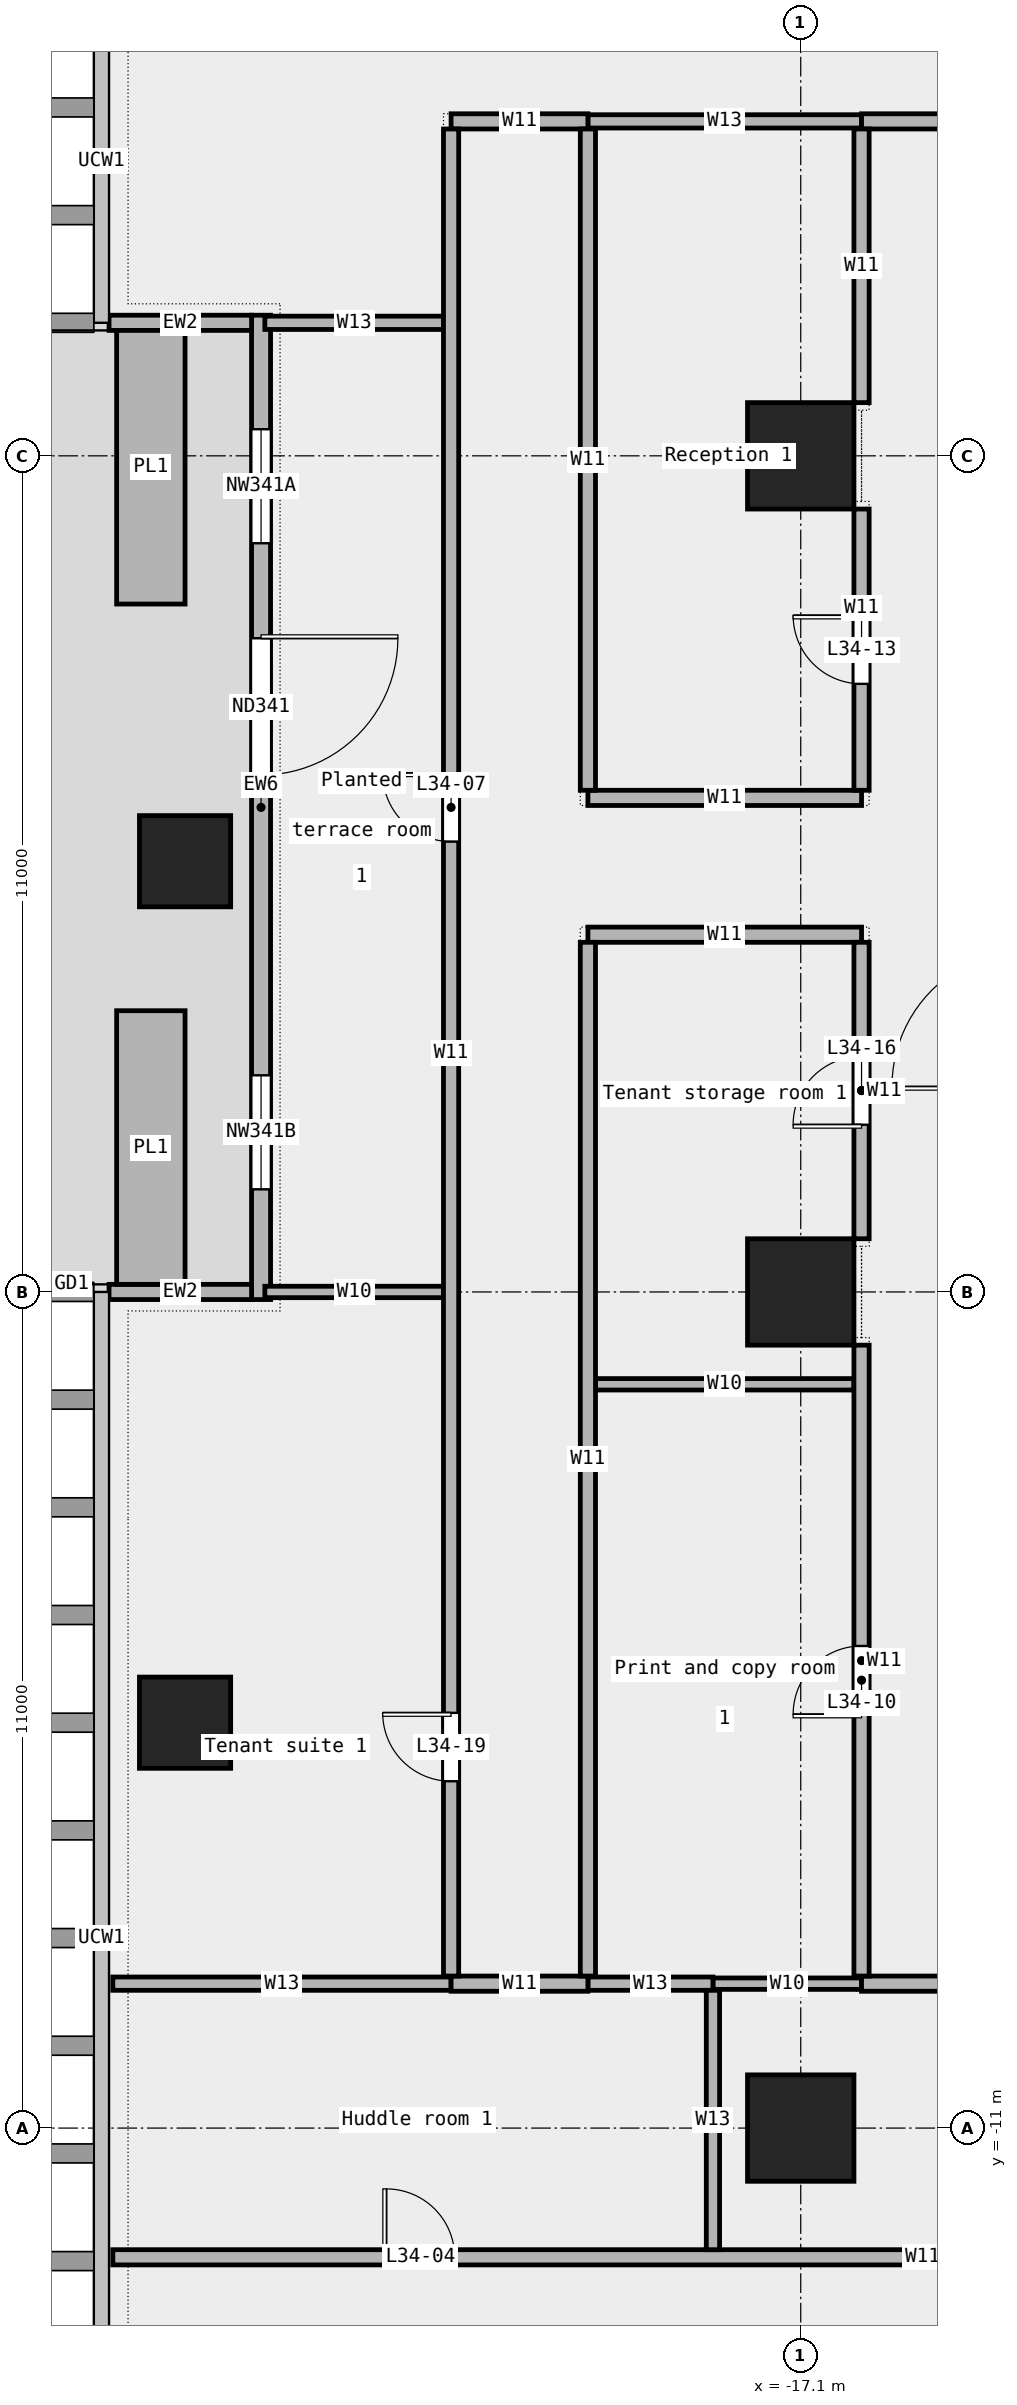
"""IFC4 building model, lengths in metres.
Left out: names, types, materials, properties, quantities, classifications, styles, units other than length and angle.
Written with IfcOpenShell. Run it as: python <this file> out.ifc"""

import sys

from ifc_helpers import new_model, si_unit, direction, frame, frame_2d, origin, origin_2d, place, context, subcontext, project, spatial, rectangle, extrude, element, fill, save


model = new_model("IFC4")
c1 = context("Model", 3, precision=1e-05, world=origin(), true_north=direction((0.0, 1.0)))
c2 = subcontext(c1, "Body", "Model", "MODEL_VIEW")
j1 = project(units=[si_unit("LENGTHUNIT", "METRE"), si_unit("PLANEANGLEUNIT", "RADIAN")], contexts=[c1])
p1 = place(None, origin())
s1 = spatial("IfcSite", under=j1, at=p1, CompositionType="ELEMENT")
p2 = place(p1, origin())
s2 = spatial("IfcBuilding", under=s1, at=p2, CompositionType="ELEMENT")
p3 = place(p2, frame((0.0, 0.0, 169.0)))
s3 = spatial("IfcBuildingStorey", under=s2, at=p3, CompositionType="ELEMENT", Elevation=169.0)
for number, where, z_axis, x_axis in (
    (1, (-25.2, 5.667, 0.0), (0.0, 0.0, 1.0), (1.0, 0.0, 0.0)),
    (2, (-25.2, -5.667, 0.0), (0.0, 0.0, 1.0), (1.0, 0.0, 0.0)),
):
    element("IfcColumn", number, at=place(p3, frame(where, z_axis=z_axis, x_axis=x_axis)), inside=s3, PredefinedType="COLUMN", context=c2, shape_type="SweptSolid", body=[
        extrude(rectangle(XDim=1.2, YDim=1.2, at=origin_2d()), origin(), (0.0, 0.0, 1.0), 3.6),
    ])
for number, where, z_axis, x_axis in (
    (3, (-17.1, -11.0, 0.0), (0.0, 0.0, 1.0), (1.0, 0.0, 0.0)),
    (4, (-17.1, 0.0, 0.0), (0.0, 0.0, 1.0), (1.0, 0.0, 0.0)),
    (5, (-17.1, 11.0, 0.0), (0.0, 0.0, 1.0), (1.0, 0.0, 0.0)),
):
    element("IfcColumn", number, at=place(p3, frame(where, z_axis=z_axis, x_axis=x_axis)), inside=s3, PredefinedType="COLUMN", context=c2, shape_type="SweptSolid", body=[
        extrude(rectangle(XDim=1.4, YDim=1.4, at=origin_2d()), origin(), (0.0, 0.0, 1.0), 3.6),
    ])
p4 = place(p3, frame((-24.2, 12.85, 0.0), z_axis=(0.0, 0.0, 1.0), x_axis=(0.0, -1.0, 0.0)))
e6 = element("IfcWall", 6, at=p4, inside=s3, PredefinedType="STANDARD", context=c2, shape_type="SweptSolid", body=[
    extrude(rectangle(XDim=12.95, YDim=0.25, at=frame_2d((6.475, 0.0))), origin(), (0.0, 0.0, 1.0), 3.6),
])
p5 = place(p4, frame((1.5, 0.0, 0.45)))
e7 = element("IfcOpeningElement", 7, at=p5, cuts=e6, PredefinedType="OPENING", context=c2, shape_type="SweptSolid", body=[
    extrude(rectangle(XDim=1.5, YDim=2.4, at=frame_2d((0.75, 1.2))), frame((0.0, 0.137, 0.0), z_axis=(0.0, -1.0, 0.0), x_axis=(1.0, 0.0, 0.0)), (0.0, 0.0, 1.0), 0.274),
])
p6 = place(p4, frame((4.25, 0.0, 0.0)))
e8 = element("IfcOpeningElement", 8, at=p6, cuts=e6, PredefinedType="OPENING", context=c2, shape_type="SweptSolid", body=[
    extrude(rectangle(XDim=1.8, YDim=2.4, at=frame_2d((0.9, 1.2))), frame((0.0, 0.137, 0.0), z_axis=(0.0, -1.0, 0.0), x_axis=(1.0, 0.0, 0.0)), (0.0, 0.0, 1.0), 0.274),
])
p7 = place(p4, frame((10.0, 0.0, 0.45)))
e9 = element("IfcOpeningElement", 9, at=p7, cuts=e6, PredefinedType="OPENING", context=c2, shape_type="SweptSolid", body=[
    extrude(rectangle(XDim=1.5, YDim=2.4, at=frame_2d((0.75, 1.2))), frame((0.0, 0.137, 0.0), z_axis=(0.0, -1.0, 0.0), x_axis=(1.0, 0.0, 0.0)), (0.0, 0.0, 1.0), 0.274),
])
for number, where, z_axis, x_axis in (
    (10, (-26.2, 12.75, 0.0), (0.0, 0.0, 1.0), (1.0, 0.0, 0.0)),
    (11, (-26.2, 0.0, 0.0), (0.0, 0.0, 1.0), (1.0, 0.0, 0.0)),
):
    element("IfcWall", number, at=place(p3, frame(where, z_axis=z_axis, x_axis=x_axis)), inside=s3, PredefinedType="STANDARD", context=c2, shape_type="SweptSolid", body=[
        extrude(rectangle(XDim=1.875, YDim=0.2, at=frame_2d((0.938, 0.0))), origin(), (0.0, 0.0, 1.0), 3.6),
    ])
for number, where, z_axis, x_axis in (
    (12, (-25.65, 12.65, 0.0), (0.0, 0.0, 1.0), (0.0, -1.0, 0.0)),
    (13, (-25.65, 3.7, 0.0), (0.0, 0.0, 1.0), (0.0, -1.0, 0.0)),
):
    element("IfcWall", number, at=place(p3, frame(where, z_axis=z_axis, x_axis=x_axis)), inside=s3, PredefinedType="STANDARD", context=c2, shape_type="SweptSolid", body=[
        extrude(rectangle(XDim=3.6, YDim=0.9, at=frame_2d((1.8, 0.0))), origin(), (0.0, 0.0, 1.0), 0.7),
    ])
p8 = place(p3, frame((-26.15, -12.7, 0.0), z_axis=(0.0, 0.0, 1.0), x_axis=(1.0, 0.0, 0.0)))
e14 = element("IfcWall", 14, at=p8, inside=s3, PredefinedType="PARTITIONING", context=c2, shape_type="SweptSolid", body=[
    extrude(rectangle(XDim=21.31, YDim=0.2, at=frame_2d((10.655, 0.0))), origin(), (0.0, 0.0, 1.0), 3.6),
])
p9 = place(p8, frame((3.597, 0.0, 0.0)))
e15 = element("IfcOpeningElement", 15, at=p9, cuts=e14, PredefinedType="OPENING", context=c2, shape_type="SweptSolid", body=[
    extrude(rectangle(XDim=0.9, YDim=2.1, at=frame_2d((0.45, 1.05))), frame((0.0, 0.112, 0.0), z_axis=(0.0, -1.0, 0.0), x_axis=(1.0, 0.0, 0.0)), (0.0, 0.0, 1.0), 0.224),
])
p10 = place(p8, frame((14.002, 0.0, 0.0)))
e16 = element("IfcOpeningElement", 16, at=p10, cuts=e14, PredefinedType="OPENING", context=c2, shape_type="SweptSolid", body=[
    extrude(rectangle(XDim=1.2, YDim=2.1, at=frame_2d((0.6, 1.05))), frame((0.0, 0.112, 0.0), z_axis=(0.0, -1.0, 0.0), x_axis=(1.0, 0.0, 0.0)), (0.0, 0.0, 1.0), 0.224),
])
p11 = place(p3, frame((-18.255, -9.1, 0.0), z_axis=(0.0, 0.0, 1.0), x_axis=(1.0, 0.0, 0.0)))
e17 = element("IfcWall", 17, at=p11, inside=s3, PredefinedType="PARTITIONING", context=c2, shape_type="SweptSolid", body=[
    extrude(rectangle(XDim=1.955, YDim=0.15, at=frame_2d((0.978, 0.0))), origin(), (0.0, 0.0, 1.0), 3.6),
])
p12 = place(p3, frame((-26.15, -9.1, 0.0), z_axis=(0.0, 0.0, 1.0), x_axis=(1.0, 0.0, 0.0)))
e18 = element("IfcWall", 18, at=p12, inside=s3, PredefinedType="PARTITIONING", context=c2, shape_type="SweptSolid", body=[
    extrude(rectangle(XDim=4.45, YDim=0.175, at=frame_2d((2.225, 0.0))), origin(), (0.0, 0.0, 1.0), 3.6),
])
p13 = place(p3, frame((-19.9, -9.1, 0.0), z_axis=(0.0, 0.0, 1.0), x_axis=(1.0, 0.0, 0.0)))
e19 = element("IfcWall", 19, at=p13, inside=s3, PredefinedType="PARTITIONING", context=c2, shape_type="SweptSolid", body=[
    extrude(rectangle(XDim=1.645, YDim=0.175, at=frame_2d((0.823, 0.0))), origin(), (0.0, 0.0, 1.0), 3.6),
])
p14 = place(p3, frame((-21.7, -9.1, 0.0), z_axis=(0.0, 0.0, 1.0), x_axis=(1.0, 0.0, 0.0)))
e20 = element("IfcWall", 20, at=p14, inside=s3, PredefinedType="PARTITIONING", context=c2, shape_type="SweptSolid", body=[
    extrude(rectangle(XDim=1.8, YDim=0.2, at=frame_2d((0.9, 0.0))), origin(), (0.0, 0.0, 1.0), 3.6),
])
p15 = place(p3, frame((-16.3, -9.1, 0.0), z_axis=(0.0, 0.0, 1.0), x_axis=(1.0, 0.0, 0.0)))
e21 = element("IfcWall", 21, at=p15, inside=s3, PredefinedType="PARTITIONING", context=c2, shape_type="SweptSolid", body=[
    extrude(rectangle(XDim=11.46, YDim=0.2, at=frame_2d((5.73, 0.0))), origin(), (0.0, 0.0, 1.0), 3.6),
])
p16 = place(p3, frame((-19.8, -1.215, 0.0), z_axis=(0.0, 0.0, 1.0), x_axis=(1.0, 0.0, 0.0)))
e22 = element("IfcWall", 22, at=p16, inside=s3, PredefinedType="PARTITIONING", context=c2, shape_type="SweptSolid", body=[
    extrude(rectangle(XDim=3.4, YDim=0.15, at=frame_2d((1.7, 0.0))), origin(), (0.0, 0.0, 1.0), 3.6),
])
p17 = place(p3, frame((-24.15, 0.0, 0.0), z_axis=(0.0, 0.0, 1.0), x_axis=(1.0, 0.0, 0.0)))
e23 = element("IfcWall", 23, at=p17, inside=s3, PredefinedType="PARTITIONING", context=c2, shape_type="SweptSolid", body=[
    extrude(rectangle(XDim=2.35, YDim=0.15, at=frame_2d((1.175, 0.0))), origin(), (0.0, 0.0, 1.0), 3.6),
])
for number, where, z_axis, x_axis in (
    (24, (-19.9, 4.7, 0.0), (0.0, 0.0, 1.0), (1.0, 0.0, 0.0)),
    (25, (-19.9, 6.5, 0.0), (0.0, 0.0, 1.0), (1.0, 0.0, 0.0)),
):
    element("IfcWall", number, at=place(p3, frame(where, z_axis=z_axis, x_axis=x_axis)), inside=s3, PredefinedType="PARTITIONING", context=c2, shape_type="SweptSolid", body=[
        extrude(rectangle(XDim=3.6, YDim=0.2, at=frame_2d((1.8, 0.0))), origin(), (0.0, 0.0, 1.0), 3.6),
    ])
p18 = place(p3, frame((-24.15, 12.75, 0.0), z_axis=(0.0, 0.0, 1.0), x_axis=(1.0, 0.0, 0.0)))
e26 = element("IfcWall", 26, at=p18, inside=s3, PredefinedType="PARTITIONING", context=c2, shape_type="SweptSolid", body=[
    extrude(rectangle(XDim=2.35, YDim=0.175, at=frame_2d((1.175, 0.0))), origin(), (0.0, 0.0, 1.0), 3.6),
])
p19 = place(p3, frame((-19.9, 15.4, 0.0), z_axis=(0.0, 0.0, 1.0), x_axis=(1.0, 0.0, 0.0)))
e27 = element("IfcWall", 27, at=p19, inside=s3, PredefinedType="PARTITIONING", context=c2, shape_type="SweptSolid", body=[
    extrude(rectangle(XDim=3.6, YDim=0.175, at=frame_2d((1.8, 0.0))), origin(), (0.0, 0.0, 1.0), 3.6),
])
p20 = place(p3, frame((-21.7, 15.4, 0.0), z_axis=(0.0, 0.0, 1.0), x_axis=(1.0, 0.0, 0.0)))
e28 = element("IfcWall", 28, at=p20, inside=s3, PredefinedType="PARTITIONING", context=c2, shape_type="SweptSolid", body=[
    extrude(rectangle(XDim=1.8, YDim=0.2, at=frame_2d((0.9, 0.0))), origin(), (0.0, 0.0, 1.0), 3.6),
])
p21 = place(p3, frame((-16.3, 15.4, 0.0), z_axis=(0.0, 0.0, 1.0), x_axis=(1.0, 0.0, 0.0)))
e29 = element("IfcWall", 29, at=p21, inside=s3, PredefinedType="PARTITIONING", context=c2, shape_type="SweptSolid", body=[
    extrude(rectangle(XDim=32.6, YDim=0.2, at=frame_2d((16.3, 0.0))), origin(), (0.0, 0.0, 1.0), 3.6),
])
p22 = place(p21, frame((24.415, 0.0, 0.0)))
e30 = element("IfcOpeningElement", 30, at=p22, cuts=e29, PredefinedType="OPENING", context=c2, shape_type="SweptSolid", body=[
    extrude(rectangle(XDim=1.8, YDim=2.1, at=frame_2d((0.9, 1.05))), frame((0.0, 0.112, 0.0), z_axis=(0.0, -1.0, 0.0), x_axis=(1.0, 0.0, 0.0)), (0.0, 0.0, 1.0), 0.224),
])
p23 = place(p21, frame((12.24, 0.0, 0.0)))
e31 = element("IfcOpeningElement", 31, at=p23, cuts=e29, PredefinedType="OPENING", context=c2, shape_type="SweptSolid", body=[
    extrude(rectangle(XDim=1.2, YDim=2.1, at=frame_2d((0.6, 1.05))), frame((0.0, 0.112, 0.0), z_axis=(0.0, -1.0, 0.0), x_axis=(1.0, 0.0, 0.0)), (0.0, 0.0, 1.0), 0.224),
])
p24 = place(p21, frame((3.075, 0.0, 0.0)))
e32 = element("IfcOpeningElement", 32, at=p24, cuts=e29, PredefinedType="OPENING", context=c2, shape_type="SweptSolid", body=[
    extrude(rectangle(XDim=1.5, YDim=2.1, at=frame_2d((0.75, 1.05))), frame((0.0, 0.112, 0.0), z_axis=(0.0, -1.0, 0.0), x_axis=(1.0, 0.0, 0.0)), (0.0, 0.0, 1.0), 0.224),
])
p25 = place(p3, frame((-21.7, -9.0, 0.0), z_axis=(0.0, 0.0, 1.0), x_axis=(0.0, 1.0, 0.0)))
e33 = element("IfcWall", 33, at=p25, inside=s3, PredefinedType="PARTITIONING", context=c2, shape_type="SweptSolid", body=[
    extrude(rectangle(XDim=24.3, YDim=0.2, at=frame_2d((12.15, 0.0))), origin(), (0.0, 0.0, 1.0), 3.6),
])
p26 = place(p25, frame((14.925, 0.0, 0.0)))
e34 = element("IfcOpeningElement", 34, at=p26, cuts=e33, PredefinedType="OPENING", context=c2, shape_type="SweptSolid", body=[
    extrude(rectangle(XDim=0.9, YDim=2.1, at=frame_2d((0.45, 1.05))), frame((0.0, 0.112, 0.0), z_axis=(0.0, -1.0, 0.0), x_axis=(1.0, 0.0, 0.0)), (0.0, 0.0, 1.0), 0.224),
])
p27 = place(p25, frame((2.562, 0.0, 0.0)))
e35 = element("IfcOpeningElement", 35, at=p27, cuts=e33, PredefinedType="OPENING", context=c2, shape_type="SweptSolid", body=[
    extrude(rectangle(XDim=0.9, YDim=2.1, at=frame_2d((0.45, 1.05))), frame((0.0, 0.112, 0.0), z_axis=(0.0, -1.0, 0.0), x_axis=(1.0, 0.0, 0.0)), (0.0, 0.0, 1.0), 0.224),
])
p28 = place(p3, frame((-19.9, -9.0, 0.0), z_axis=(0.0, 0.0, 1.0), x_axis=(0.0, 1.0, 0.0)))
e36 = element("IfcWall", 36, at=p28, inside=s3, PredefinedType="PARTITIONING", context=c2, shape_type="SweptSolid", body=[
    extrude(rectangle(XDim=13.6, YDim=0.2, at=frame_2d((6.8, 0.0))), origin(), (0.0, 0.0, 1.0), 3.6),
])
p29 = place(p3, frame((-19.9, 6.6, 0.0), z_axis=(0.0, 0.0, 1.0), x_axis=(0.0, 1.0, 0.0)))
e37 = element("IfcWall", 37, at=p29, inside=s3, PredefinedType="PARTITIONING", context=c2, shape_type="SweptSolid", body=[
    extrude(rectangle(XDim=8.7, YDim=0.2, at=frame_2d((4.35, 0.0))), origin(), (0.0, 0.0, 1.0), 3.6),
])
p30 = place(p3, frame((-18.255, -12.6, 0.0), z_axis=(0.0, 0.0, 1.0), x_axis=(0.0, 1.0, 0.0)))
e38 = element("IfcWall", 38, at=p30, inside=s3, PredefinedType="PARTITIONING", context=c2, shape_type="SweptSolid", body=[
    extrude(rectangle(XDim=3.412, YDim=0.175, at=frame_2d((1.706, 0.0))), origin(), (0.0, 0.0, 1.0), 3.6),
])
p31 = place(p3, frame((-16.3, -9.0, 0.0), z_axis=(0.0, 0.0, 1.0), x_axis=(0.0, 1.0, 0.0)))
e39 = element("IfcWall", 39, at=p31, inside=s3, PredefinedType="PARTITIONING", context=c2, shape_type="SweptSolid", body=[
    extrude(rectangle(XDim=8.3, YDim=0.2, at=frame_2d((4.15, 0.0))), origin(), (0.0, 0.0, 1.0), 3.6),
])
p32 = place(p31, frame((3.442, 0.0, 0.0)))
e40 = element("IfcOpeningElement", 40, at=p32, cuts=e39, PredefinedType="OPENING", context=c2, shape_type="SweptSolid", body=[
    extrude(rectangle(XDim=0.9, YDim=2.1, at=frame_2d((0.45, 1.05))), frame((0.0, 0.112, 0.0), z_axis=(0.0, -1.0, 0.0), x_axis=(1.0, 0.0, 0.0)), (0.0, 0.0, 1.0), 0.224),
])
p33 = place(p3, frame((-16.3, 0.7, 0.0), z_axis=(0.0, 0.0, 1.0), x_axis=(0.0, 1.0, 0.0)))
e41 = element("IfcWall", 41, at=p33, inside=s3, PredefinedType="PARTITIONING", context=c2, shape_type="SweptSolid", body=[
    extrude(rectangle(XDim=3.9, YDim=0.2, at=frame_2d((1.95, 0.0))), origin(), (0.0, 0.0, 1.0), 3.6),
])
p34 = place(p33, frame((1.5, 0.0, 0.0)))
e42 = element("IfcOpeningElement", 42, at=p34, cuts=e41, PredefinedType="OPENING", context=c2, shape_type="SweptSolid", body=[
    extrude(rectangle(XDim=0.9, YDim=2.1, at=frame_2d((0.45, 1.05))), frame((0.0, 0.112, 0.0), z_axis=(0.0, -1.0, 0.0), x_axis=(1.0, 0.0, 0.0)), (0.0, 0.0, 1.0), 0.224),
])
p35 = place(p3, frame((-16.3, 6.6, 0.0), z_axis=(0.0, 0.0, 1.0), x_axis=(0.0, 1.0, 0.0)))
e43 = element("IfcWall", 43, at=p35, inside=s3, PredefinedType="PARTITIONING", context=c2, shape_type="SweptSolid", body=[
    extrude(rectangle(XDim=3.7, YDim=0.2, at=frame_2d((1.85, 0.0))), origin(), (0.0, 0.0, 1.0), 3.6),
])
p36 = place(p35, frame((1.4, 0.0, 0.0)))
e44 = element("IfcOpeningElement", 44, at=p36, cuts=e43, PredefinedType="OPENING", context=c2, shape_type="SweptSolid", body=[
    extrude(rectangle(XDim=0.9, YDim=2.1, at=frame_2d((0.45, 1.05))), frame((0.0, 0.112, 0.0), z_axis=(0.0, -1.0, 0.0), x_axis=(1.0, 0.0, 0.0)), (0.0, 0.0, 1.0), 0.224),
])
p37 = place(p3, frame((-16.3, 11.7, 0.0), z_axis=(0.0, 0.0, 1.0), x_axis=(0.0, 1.0, 0.0)))
e45 = element("IfcWall", 45, at=p37, inside=s3, PredefinedType="PARTITIONING", context=c2, shape_type="SweptSolid", body=[
    extrude(rectangle(XDim=3.6, YDim=0.2, at=frame_2d((1.8, 0.0))), origin(), (0.0, 0.0, 1.0), 3.6),
])
p38 = place(p5, origin())
e46 = element("IfcWindow", 46, at=p38, inside=s3, PartitioningType="SINGLE_PANEL", PredefinedType="WINDOW", context=c2, shape_type="SweptSolid", body=[
    extrude(rectangle(XDim=1.5, YDim=2.4, at=frame_2d((0.75, 1.2))), frame((0.0, 0.03, 0.0), z_axis=(0.0, -1.0, 0.0), x_axis=(1.0, 0.0, 0.0)), (0.0, 0.0, 1.0), 0.06),
])
fill(e7, e46)
p39 = place(p6, origin())
e47 = element("IfcDoor", 47, at=p39, inside=s3, OperationType="DOUBLE_DOOR_SINGLE_SWING", PredefinedType="DOOR", context=c2, shape_type="SweptSolid", body=[
    extrude(rectangle(XDim=1.8, YDim=2.4, at=frame_2d((0.9, 1.2))), frame((0.0, 0.025, 0.0), z_axis=(0.0, -1.0, 0.0), x_axis=(1.0, 0.0, 0.0)), (0.0, 0.0, 1.0), 0.05),
])
fill(e8, e47)
p40 = place(p7, origin())
e48 = element("IfcWindow", 48, at=p40, inside=s3, PartitioningType="SINGLE_PANEL", PredefinedType="WINDOW", context=c2, shape_type="SweptSolid", body=[
    extrude(rectangle(XDim=1.5, YDim=2.4, at=frame_2d((0.75, 1.2))), frame((0.0, 0.03, 0.0), z_axis=(0.0, -1.0, 0.0), x_axis=(1.0, 0.0, 0.0)), (0.0, 0.0, 1.0), 0.06),
])
fill(e9, e48)
p41 = place(p9, origin())
e49 = element("IfcDoor", 49, at=p41, inside=s3, OperationType="SINGLE_SWING_LEFT", PredefinedType="DOOR", context=c2, shape_type="SweptSolid", body=[
    extrude(rectangle(XDim=0.9, YDim=2.1, at=frame_2d((0.45, 1.05))), frame((0.0, 0.025, 0.0), z_axis=(0.0, -1.0, 0.0), x_axis=(1.0, 0.0, 0.0)), (0.0, 0.0, 1.0), 0.05),
])
fill(e15, e49)
p42 = place(p26, origin())
e50 = element("IfcDoor", 50, at=p42, inside=s3, OperationType="SINGLE_SWING_RIGHT", PredefinedType="DOOR", context=c2, shape_type="SweptSolid", body=[
    extrude(rectangle(XDim=0.9, YDim=2.1, at=frame_2d((0.45, 1.05))), frame((0.0, 0.025, 0.0), z_axis=(0.0, -1.0, 0.0), x_axis=(1.0, 0.0, 0.0)), (0.0, 0.0, 1.0), 0.05),
])
fill(e34, e50)
p43 = place(p32, origin())
e51 = element("IfcDoor", 51, at=p43, inside=s3, OperationType="SINGLE_SWING_LEFT", PredefinedType="DOOR", context=c2, shape_type="SweptSolid", body=[
    extrude(rectangle(XDim=0.9, YDim=2.1, at=frame_2d((0.45, 1.05))), frame((0.0, 0.025, 0.0), z_axis=(0.0, -1.0, 0.0), x_axis=(1.0, 0.0, 0.0)), (0.0, 0.0, 1.0), 0.05),
])
fill(e40, e51)
p44 = place(p36, origin())
e52 = element("IfcDoor", 52, at=p44, inside=s3, OperationType="SINGLE_SWING_RIGHT", PredefinedType="DOOR", context=c2, shape_type="SweptSolid", body=[
    extrude(rectangle(XDim=0.9, YDim=2.1, at=frame_2d((0.45, 1.05))), frame((0.0, 0.025, 0.0), z_axis=(0.0, -1.0, 0.0), x_axis=(1.0, 0.0, 0.0)), (0.0, 0.0, 1.0), 0.05),
])
fill(e44, e52)
p45 = place(p34, origin())
e53 = element("IfcDoor", 53, at=p45, inside=s3, OperationType="SINGLE_SWING_LEFT", PredefinedType="DOOR", context=c2, shape_type="SweptSolid", body=[
    extrude(rectangle(XDim=0.9, YDim=2.1, at=frame_2d((0.45, 1.05))), frame((0.0, 0.025, 0.0), z_axis=(0.0, -1.0, 0.0), x_axis=(1.0, 0.0, 0.0)), (0.0, 0.0, 1.0), 0.05),
])
fill(e42, e53)
p46 = place(p27, origin())
e54 = element("IfcDoor", 54, at=p46, inside=s3, OperationType="SINGLE_SWING_RIGHT", PredefinedType="DOOR", context=c2, shape_type="SweptSolid", body=[
    extrude(rectangle(XDim=0.9, YDim=2.1, at=frame_2d((0.45, 1.05))), frame((0.0, 0.025, 0.0), z_axis=(0.0, -1.0, 0.0), x_axis=(1.0, 0.0, 0.0)), (0.0, 0.0, 1.0), 0.05),
])
fill(e35, e54)
save(model, sys.argv[1])
